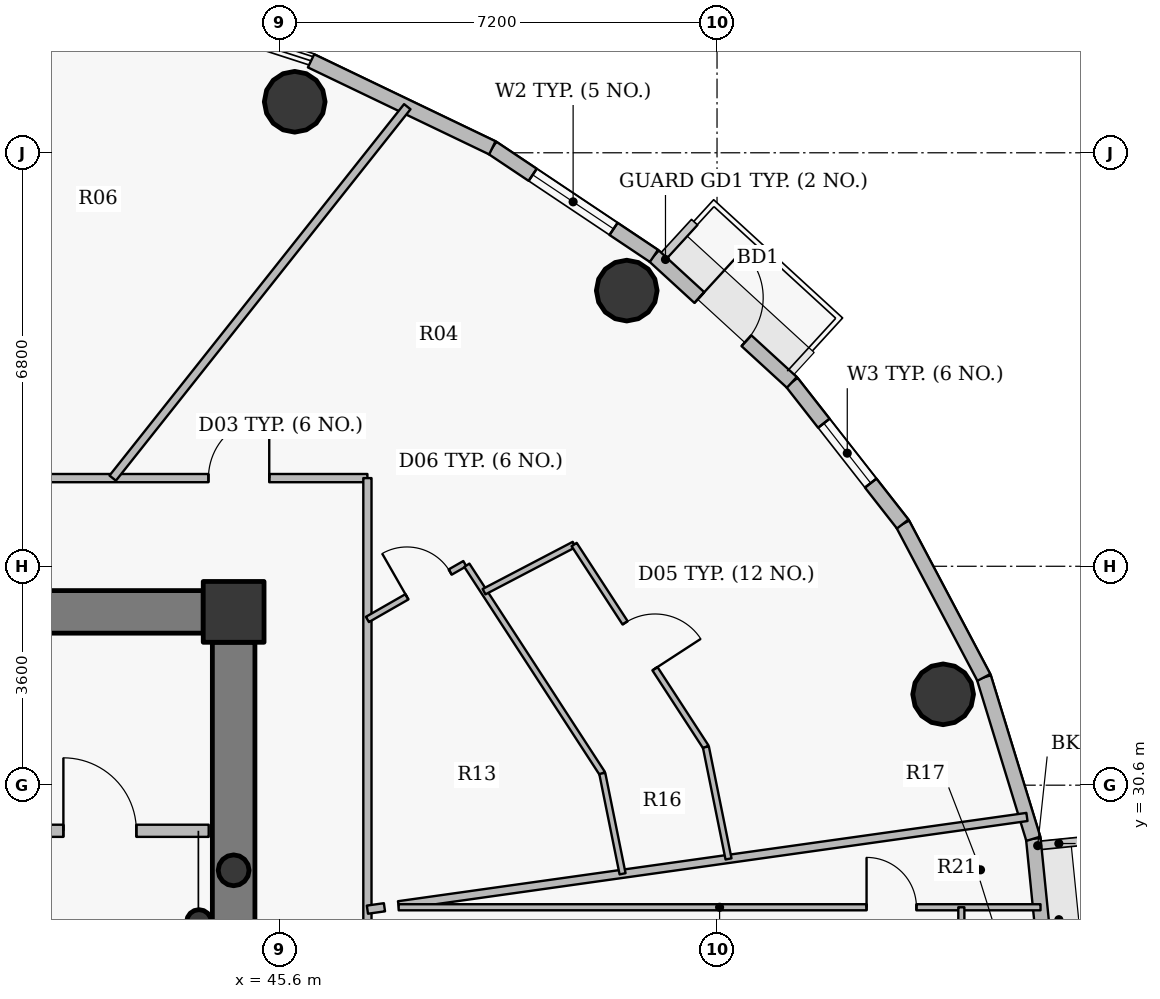
"""IFC4 building model, lengths in metres.
Left out: names, types, materials, properties, quantities, classifications, styles, units other than length and angle.
Written with IfcOpenShell. Run it as: python <this file> out.ifc"""

import sys

from ifc_helpers import new_model, si_unit, direction, frame, frame_2d, origin, origin_2d, place, context, subcontext, project, spatial, rectangle, hollow_circle, extrude, source, transform, mapped, element, fill, save


model = new_model("IFC4")
c1 = context("Model", 3, precision=1e-05, world=origin(), true_north=direction((0.0, 1.0)))
c2 = subcontext(c1, "Body", "Model", "MODEL_VIEW")
j1 = project(units=[si_unit("LENGTHUNIT", "METRE"), si_unit("PLANEANGLEUNIT", "RADIAN")], contexts=[c1])
p1 = place(None, origin())
s1 = spatial("IfcSite", under=j1, at=p1, CompositionType="ELEMENT")
p2 = place(p1, origin())
s2 = spatial("IfcBuilding", under=s1, at=p2, CompositionType="ELEMENT")
p3 = place(p2, frame((0.0, 0.0, 276.75)))
s3 = spatial("IfcBuildingStorey", under=s2, at=p3, CompositionType="ELEMENT", Elevation=276.75)
p4 = place(p3, frame((44.85, 33.45, 0.0), z_axis=(0.0, 0.0, 1.0), x_axis=(1.0, 0.0, 0.0)))
e1 = element("IfcColumn", 1, at=p4, inside=s3, PredefinedType="COLUMN", context=c2, shape_type="SweptSolid", body=[
    extrude(rectangle(XDim=1.0, YDim=1.0, at=origin_2d()), origin(), (0.0, 0.0, 1.0), 3.75),
])
p5 = place(p3, frame((44.28, 28.35, 0.0), z_axis=(0.0, 0.0, 1.0), x_axis=(1.0, 0.0, 0.0)))
e2 = element("IfcColumn", 2, at=p5, inside=s3, PredefinedType="COLUMN", context=c2, shape_type="SweptSolid", body=[
    extrude(hollow_circle(Radius=0.203, WallThickness=0.016, at=origin_2d()), origin(), (0.0, 0.0, 1.0), 3.75),
])
p6 = place(p3, frame((27.65, 33.45, 0.0), z_axis=(0.0, 0.0, 1.0), x_axis=(1.0, 0.0, 0.0)))
e3 = element("IfcWall", 3, at=p6, inside=s3, PredefinedType="SHEAR", context=c2, shape_type="SweptSolid", body=[
    extrude(rectangle(XDim=16.7, YDim=0.7, at=frame_2d((8.35, 0.0))), origin(), (0.0, 0.0, 1.0), 3.05),
])
p7 = place(p6, frame((12.775, 0.0, 0.0)))
e4 = element("IfcOpeningElement", 4, at=p7, cuts=e3, PredefinedType="OPENING", context=c2, shape_type="SweptSolid", body=[
    extrude(rectangle(XDim=1.15, YDim=2.15, at=origin_2d()), frame((0.575, 0.36, 1.075), z_axis=(0.0, -1.0, 0.0), x_axis=(1.0, 0.0, 0.0)), (0.0, 0.0, 1.0), 0.72),
])
p8 = place(p3, frame((44.85, 32.95, 0.0), z_axis=(0.0, 0.0, 1.0), x_axis=(0.0, -1.0, 0.0)))
e5 = element("IfcWall", 5, at=p8, inside=s3, PredefinedType="SHEAR", context=c2, shape_type="SweptSolid", body=[
    extrude(rectangle(XDim=11.9, YDim=0.7, at=frame_2d((5.95, 0.0))), origin(), (0.0, 0.0, 1.0), 3.05),
])
for number, where, z_axis, x_axis in (
    (6, (56.519, 32.094, 0.0), (0.0, 0.0, 1.0), (1.0, 0.0, 0.0)),
    (7, (51.315, 38.733, 0.0), (0.0, 0.0, 1.0), (1.0, 0.0, 0.0)),
    (8, (45.854, 41.839, 0.0), (0.0, 0.0, 1.0), (1.0, 0.0, 0.0)),
):
    element("IfcColumn", number, at=place(p3, frame(where, z_axis=z_axis, x_axis=x_axis)), inside=s3, PredefinedType="COLUMN", context=c2, shape_type="SweptSolid", body=[
        extrude(hollow_circle(Radius=0.5, WallThickness=0.032, at=origin_2d()), origin(), (0.0, 0.0, 1.0), 3.75),
    ])
p9 = place(p3, frame((44.85, 29.2, 0.0), z_axis=(0.0, 0.0, 1.0), x_axis=(1.0, 0.0, 0.0)))
e9 = element("IfcColumn", 9, at=p9, inside=s3, PredefinedType="COLUMN", context=c2, shape_type="SweptSolid", body=[
    extrude(hollow_circle(Radius=0.254, WallThickness=0.02, at=origin_2d()), origin(), (0.0, 0.0, 1.0), 3.75),
])
p10 = place(p3, frame((58.002, 29.719, 0.0), z_axis=(0.0, 0.0, 1.0), x_axis=(0.099972526841, -0.99499019788, 0.0)))
e10 = element("IfcWall", 10, at=p10, inside=s3, PredefinedType="SOLIDWALL", context=c2, shape_type="SweptSolid", body=[
    extrude(rectangle(XDim=2.733, YDim=0.24, at=frame_2d((1.366, 0.0))), origin(), (0.0, 0.0, 1.0), 3.5),
])
p11 = place(p3, frame((57.188, 32.372, 0.0), z_axis=(0.0, 0.0, 1.0), x_axis=(0.2931213403, -0.956075248012, 0.0)))
e11 = element("IfcWall", 11, at=p11, inside=s3, PredefinedType="SOLIDWALL", context=c2, shape_type="SweptSolid", body=[
    extrude(rectangle(XDim=2.775, YDim=0.24, at=frame_2d((1.388, 0.0))), origin(), (0.0, 0.0, 1.0), 3.5),
])
p12 = place(p3, frame((55.854, 34.895, 0.0), z_axis=(0.0, 0.0, 1.0), x_axis=(0.467628269026, -0.883925224218, 0.0)))
e12 = element("IfcWall", 12, at=p12, inside=s3, PredefinedType="SOLIDWALL", context=c2, shape_type="SweptSolid", body=[
    extrude(rectangle(XDim=2.854, YDim=0.24, at=frame_2d((1.427, 0.0))), origin(), (0.0, 0.0, 1.0), 3.5),
])
p13 = place(p3, frame((54.03, 37.225, 0.0), z_axis=(0.0, 0.0, 1.0), x_axis=(0.616337186556, -0.787482363275, 0.0)))
e13 = element("IfcWall", 13, at=p13, inside=s3, PredefinedType="SOLIDWALL", context=c2, shape_type="SweptSolid", body=[
    extrude(rectangle(XDim=2.958, YDim=0.24, at=frame_2d((1.479, 0.0))), origin(), (0.0, 0.0, 1.0), 3.5),
])
p14 = place(p13, frame((0.854, 0.0, 0.9)))
e14 = element("IfcOpeningElement", 14, at=p14, cuts=e13, PredefinedType="OPENING", context=c2, shape_type="SweptSolid", body=[
    extrude(rectangle(XDim=1.25, YDim=1.65, at=origin_2d()), frame((0.625, 0.13, 0.825), z_axis=(0.0, -1.0, 0.0), x_axis=(1.0, 0.0, 0.0)), (0.0, 0.0, 1.0), 0.26),
])
p15 = place(p3, frame((51.762, 39.304, 0.0), z_axis=(0.0, 0.0, 1.0), x_axis=(0.737068506972, -0.675818034703, 0.0)))
e15 = element("IfcWall", 15, at=p15, inside=s3, PredefinedType="SOLIDWALL", context=c2, shape_type="SweptSolid", body=[
    extrude(rectangle(XDim=3.077, YDim=0.24, at=frame_2d((1.539, 0.0))), origin(), (0.0, 0.0, 1.0), 3.5),
])
p16 = place(p15, frame((1.014, 0.0, 0.0)))
e16 = element("IfcOpeningElement", 16, at=p16, cuts=e15, PredefinedType="OPENING", context=c2, shape_type="SweptSolid", body=[
    extrude(rectangle(XDim=1.05, YDim=2.15, at=origin_2d()), frame((0.525, 0.13, 1.075), z_axis=(0.0, -1.0, 0.0), x_axis=(1.0, 0.0, 0.0)), (0.0, 0.0, 1.0), 0.26),
])
p17 = place(p3, frame((49.104, 41.082, 0.0), z_axis=(0.0, 0.0, 1.0), x_axis=(0.831250592635, -0.55589787933, 0.0)))
e17 = element("IfcWall", 17, at=p17, inside=s3, PredefinedType="SOLIDWALL", context=c2, shape_type="SweptSolid", body=[
    extrude(rectangle(XDim=3.197, YDim=0.24, at=frame_2d((1.599, 0.0))), origin(), (0.0, 0.0, 1.0), 3.5),
])
p18 = place(p17, frame((0.798, 0.0, 0.9)))
e18 = element("IfcOpeningElement", 18, at=p18, cuts=e17, PredefinedType="OPENING", context=c2, shape_type="SweptSolid", body=[
    extrude(rectangle(XDim=1.6, YDim=1.75, at=origin_2d()), frame((0.8, 0.13, 0.875), z_axis=(0.0, -1.0, 0.0), x_axis=(1.0, 0.0, 0.0)), (0.0, 0.0, 1.0), 0.26),
])
p19 = place(p3, frame((46.123, 42.512, 0.0), z_axis=(0.0, 0.0, 1.0), x_axis=(0.901573741254, -0.43262546051, 0.0)))
e19 = element("IfcWall", 19, at=p19, inside=s3, PredefinedType="SOLIDWALL", context=c2, shape_type="SweptSolid", body=[
    extrude(rectangle(XDim=3.307, YDim=0.24, at=frame_2d((1.653, 0.0))), origin(), (0.0, 0.0, 1.0), 3.5),
])
p20 = place(p3, frame((35.95, 29.85, 0.0), z_axis=(0.0, 0.0, 1.0), x_axis=(1.0, 0.0, 0.0)))
e20 = element("IfcWall", 20, at=p20, inside=s3, PredefinedType="PARTITIONING", context=c2, shape_type="SweptSolid", body=[
    extrude(rectangle(XDim=8.49, YDim=0.2, at=frame_2d((4.245, 0.0))), origin(), (0.0, 0.0, 1.0), 3.085),
])
p21 = place(p20, frame((6.1, 0.0, 0.0)))
e21 = element("IfcOpeningElement", 21, at=p21, cuts=e20, PredefinedType="OPENING", context=c2, shape_type="SweptSolid", body=[
    extrude(rectangle(XDim=1.2, YDim=2.15, at=origin_2d()), frame((0.6, 0.11, 1.075), z_axis=(0.0, -1.0, 0.0), x_axis=(1.0, 0.0, 0.0)), (0.0, 0.0, 1.0), 0.22),
])
p22 = place(p20, frame((0.37, 0.0, 0.0)))
e22 = element("IfcOpeningElement", 22, at=p22, cuts=e20, PredefinedType="OPENING", context=c2, shape_type="SweptSolid", body=[
    extrude(rectangle(XDim=1.15, YDim=2.15, at=origin_2d()), frame((0.575, 0.11, 1.075), z_axis=(0.0, -1.0, 0.0), x_axis=(1.0, 0.0, 0.0)), (0.0, 0.0, 1.0), 0.22),
])
p23 = place(p20, frame((2.425, 0.0, 0.0)))
e23 = element("IfcOpeningElement", 23, at=p23, cuts=e20, PredefinedType="OPENING", context=c2, shape_type="SweptSolid", body=[
    extrude(rectangle(XDim=1.05, YDim=2.15, at=origin_2d()), frame((0.525, 0.11, 1.075), z_axis=(0.0, -1.0, 0.0), x_axis=(1.0, 0.0, 0.0)), (0.0, 0.0, 1.0), 0.22),
])
p24 = place(p3, frame((36.95, 35.65, 0.0), z_axis=(0.0, 0.0, 1.0), x_axis=(1.0, 0.0, 0.0)))
e24 = element("IfcWall", 24, at=p24, inside=s3, PredefinedType="PARTITIONING", context=c2, shape_type="SweptSolid", body=[
    extrude(rectangle(XDim=10.1, YDim=0.135, at=frame_2d((5.05, 0.0))), origin(), (0.0, 0.0, 1.0), 3.035),
])
p25 = place(p24, frame((7.486, 0.0, 0.0)))
e25 = element("IfcOpeningElement", 25, at=p25, cuts=e24, PredefinedType="OPENING", context=c2, shape_type="SweptSolid", body=[
    extrude(rectangle(XDim=1.0, YDim=2.15, at=origin_2d()), frame((0.5, 0.078, 1.075), z_axis=(0.0, -1.0, 0.0), x_axis=(1.0, 0.0, 0.0)), (0.0, 0.0, 1.0), 0.155),
])
p26 = place(p24, frame((3.272, 0.0, 0.0)))
e26 = element("IfcOpeningElement", 26, at=p26, cuts=e24, PredefinedType="OPENING", context=c2, shape_type="SweptSolid", body=[
    extrude(rectangle(XDim=1.0, YDim=2.15, at=origin_2d()), frame((0.5, 0.078, 1.075), z_axis=(0.0, -1.0, 0.0), x_axis=(1.0, 0.0, 0.0)), (0.0, 0.0, 1.0), 0.155),
])
p27 = place(p3, frame((42.861, 35.65, 0.0), z_axis=(0.0, 0.0, 1.0), x_axis=(0.621439784824, 0.783461928774, 0.0)))
e27 = element("IfcWall", 27, at=p27, inside=s3, PredefinedType="PARTITIONING", context=c2, shape_type="SweptSolid", body=[
    extrude(rectangle(XDim=7.796, YDim=0.135, at=frame_2d((3.898, 0.0))), origin(), (0.0, 0.0, 1.0), 2.985),
])
p28 = place(p3, frame((47.05, 18.503, 0.0), z_axis=(0.0, 0.0, 1.0), x_axis=(0.0, 1.0, 0.0)))
e28 = element("IfcWall", 28, at=p28, inside=s3, PredefinedType="PARTITIONING", context=c2, shape_type="SweptSolid", body=[
    extrude(rectangle(XDim=17.147, YDim=0.135, at=frame_2d((8.574, 0.0))), origin(), (0.0, 0.0, 1.0), 3.035),
])
p29 = place(p28, frame((4.545, 0.0, 0.0)))
e29 = element("IfcOpeningElement", 29, at=p29, cuts=e28, PredefinedType="OPENING", context=c2, shape_type="SweptSolid", body=[
    extrude(rectangle(XDim=1.0, YDim=2.15, at=origin_2d()), frame((0.5, 0.078, 1.075), z_axis=(0.0, -1.0, 0.0), x_axis=(1.0, 0.0, 0.0)), (0.0, 0.0, 1.0), 0.155),
])
p30 = place(p3, frame((47.05, 28.553, 0.0), z_axis=(0.0, 0.0, 1.0), x_axis=(0.990308552968, 0.138884736087, 0.0)))
e30 = element("IfcWall", 30, at=p30, inside=s3, PredefinedType="PARTITIONING", context=c2, shape_type="SweptSolid", body=[
    extrude(rectangle(XDim=0.283, YDim=0.135, at=frame_2d((0.142, 0.0))), origin(), (0.0, 0.0, 1.0), 3.5),
])
p31 = place(p3, frame((47.05, 33.326, 0.0), z_axis=(0.0, 0.0, 1.0), x_axis=(0.867827775188, 0.496865125172, 0.0)))
e31 = element("IfcWall", 31, at=p31, inside=s3, PredefinedType="PARTITIONING", context=c2, shape_type="SweptSolid", body=[
    extrude(rectangle(XDim=1.846, YDim=0.1, at=frame_2d((0.923, 0.0))), origin(), (0.0, 0.0, 1.0), 3.5),
])
p32 = place(p31, frame((0.749, 0.0, 0.0)))
e32 = element("IfcOpeningElement", 32, at=p32, cuts=e31, PredefinedType="OPENING", context=c2, shape_type="SweptSolid", body=[
    extrude(rectangle(XDim=0.82, YDim=2.1, at=origin_2d()), frame((0.41, 0.06, 1.05), z_axis=(0.0, -1.0, 0.0), x_axis=(1.0, 0.0, 0.0)), (0.0, 0.0, 1.0), 0.12),
])
p33 = place(p3, frame((47.562, 28.625, 0.0), z_axis=(0.0, 0.0, 1.0), x_axis=(0.990269276455, 0.139164507362, 0.0)))
e33 = element("IfcWall", 33, at=p33, inside=s3, PredefinedType="PARTITIONING", context=c2, shape_type="SweptSolid", body=[
    extrude(rectangle(XDim=10.437, YDim=0.135, at=frame_2d((5.218, 0.0))), origin(), (0.0, 0.0, 1.0), 2.985),
])
p34 = place(p3, frame((47.564, 28.592, 0.0), z_axis=(0.0, 0.0, 1.0), x_axis=(1.0, 0.0, 0.0)))
e34 = element("IfcWall", 34, at=p34, inside=s3, PredefinedType="PARTITIONING", context=c2, shape_type="SweptSolid", body=[
    extrude(rectangle(XDim=10.555, YDim=0.1, at=frame_2d((5.278, 0.0))), origin(), (0.0, 0.0, 1.0), 2.985),
])
p35 = place(p34, frame((7.695, 0.0, 0.0)))
e35 = element("IfcOpeningElement", 35, at=p35, cuts=e34, PredefinedType="OPENING", context=c2, shape_type="SweptSolid", body=[
    extrude(rectangle(XDim=0.82, YDim=2.1, at=origin_2d()), frame((0.41, 0.06, 1.05), z_axis=(0.0, -1.0, 0.0), x_axis=(1.0, 0.0, 0.0)), (0.0, 0.0, 1.0), 0.12),
])
p36 = place(p3, frame((48.685, 34.217, 0.0), z_axis=(0.0, 0.0, 1.0), x_axis=(0.54540855562, -0.8381703332, 0.0)))
e36 = element("IfcWall", 36, at=p36, inside=s3, PredefinedType="PARTITIONING", context=c2, shape_type="SweptSolid", body=[
    extrude(rectangle(XDim=4.084, YDim=0.1, at=frame_2d((2.042, 0.0))), origin(), (0.0, 0.0, 1.0), 3.035),
])
p37 = place(p3, frame((48.968, 33.782, 0.0), z_axis=(0.0, 0.0, 1.0), x_axis=(0.886102824681, 0.463488709779, 0.0)))
e37 = element("IfcWall", 37, at=p37, inside=s3, PredefinedType="PARTITIONING", context=c2, shape_type="SweptSolid", body=[
    extrude(rectangle(XDim=1.672, YDim=0.1, at=frame_2d((0.836, 0.0))), origin(), (0.0, 0.0, 1.0), 3.5),
])
p38 = place(p3, frame((50.45, 34.558, 0.0), z_axis=(0.0, 0.0, 1.0), x_axis=(0.545448348881, -0.838144437853, 0.0)))
e38 = element("IfcWall", 38, at=p38, inside=s3, PredefinedType="PARTITIONING", context=c2, shape_type="SweptSolid", body=[
    extrude(rectangle(XDim=3.973, YDim=0.1, at=frame_2d((1.986, 0.0))), origin(), (0.0, 0.0, 1.0), 3.035),
])
p39 = place(p38, frame((1.536, 0.0, 0.0)))
e39 = element("IfcOpeningElement", 39, at=p39, cuts=e38, PredefinedType="OPENING", context=c2, shape_type="SweptSolid", body=[
    extrude(rectangle(XDim=0.9, YDim=2.1, at=origin_2d()), frame((0.45, 0.06, 1.05), z_axis=(0.0, -1.0, 0.0), x_axis=(1.0, 0.0, 0.0)), (0.0, 0.0, 1.0), 0.12),
])
p40 = place(p3, frame((50.913, 30.794, 0.0), z_axis=(0.0, 0.0, 1.0), x_axis=(0.198233557602, -0.980154812588, 0.0)))
e40 = element("IfcWall", 40, at=p40, inside=s3, PredefinedType="PARTITIONING", context=c2, shape_type="SweptSolid", body=[
    extrude(rectangle(XDim=1.685, YDim=0.1, at=frame_2d((0.842, 0.0))), origin(), (0.0, 0.0, 1.0), 3.035),
])
p41 = place(p3, frame((52.617, 31.228, 0.0), z_axis=(0.0, 0.0, 1.0), x_axis=(0.198191443997, -0.980163329005, 0.0)))
e41 = element("IfcWall", 41, at=p41, inside=s3, PredefinedType="PARTITIONING", context=c2, shape_type="SweptSolid", body=[
    extrude(rectangle(XDim=1.877, YDim=0.1, at=frame_2d((0.939, 0.0))), origin(), (0.0, 0.0, 1.0), 3.035),
])
p42 = place(p3, frame((56.818, 20.917, 0.0), z_axis=(0.0, 0.0, 1.0), x_axis=(0.0, 1.0, 0.0)))
e42 = element("IfcWall", 42, at=p42, inside=s3, PredefinedType="PARTITIONING", context=c2, shape_type="SweptSolid", body=[
    extrude(rectangle(XDim=7.675, YDim=0.1, at=frame_2d((3.837, 0.0))), origin(), (0.0, 0.0, 1.0), 2.985),
])
p43 = place(p42, frame((3.388, 0.0, 0.0)))
e43 = element("IfcOpeningElement", 43, at=p43, cuts=e42, PredefinedType="OPENING", context=c2, shape_type="SweptSolid", body=[
    extrude(rectangle(XDim=0.9, YDim=2.1, at=origin_2d()), frame((0.45, 0.06, 1.05), z_axis=(0.0, -1.0, 0.0), x_axis=(1.0, 0.0, 0.0)), (0.0, 0.0, 1.0), 0.12),
])
p44 = place(p3, frame((45.2, 33.8, 0.0), z_axis=(0.0, 0.0, 1.0), x_axis=(-1.0, 0.0, 0.0)))
e44 = element("IfcWall", 44, at=p44, inside=s3, PredefinedType="PARTITIONING", context=c2, shape_type="SweptSolid", body=[
    extrude(rectangle(XDim=0.84, YDim=0.135, at=frame_2d((0.42, 0.0))), origin(), (0.0, 0.0, 1.0), 3.035),
])
p45 = place(p3, frame((45.2, 32.96, 0.0), z_axis=(0.0, 0.0, 1.0), x_axis=(0.0, 1.0, 0.0)))
e45 = element("IfcWall", 45, at=p45, inside=s3, PredefinedType="PARTITIONING", context=c2, shape_type="SweptSolid", body=[
    extrude(rectangle(XDim=0.532, YDim=0.135, at=frame_2d((0.266, 0.0))), origin(), (0.0, 0.0, 1.0), 3.5),
])
m1 = source(origin(), c2, "Body", "SweptSolid", [
    extrude(rectangle(XDim=1.25, YDim=1.65, at=origin_2d()), frame((0.625, 0.03, 0.825), z_axis=(0.0, -1.0, 0.0), x_axis=(1.0, 0.0, 0.0)), (0.0, 0.0, 1.0), 0.06),
])
p46 = place(p14, origin())
e46 = element("IfcWindow", 46, at=p46, inside=s3, PartitioningType="SINGLE_PANEL", PredefinedType="WINDOW", context=c2, shape_type="MappedRepresentation", body=[
    mapped(m1, transform((0.0, 0.0, 0.0), x_axis=(1.0, 0.0, 0.0), y_axis=(0.0, 1.0, 0.0), z_axis=(0.0, 0.0, 1.0), scale=1.0)),
])
fill(e14, e46)
m2 = source(origin(), c2, "Body", "SweptSolid", [
    extrude(rectangle(XDim=1.05, YDim=2.15, at=origin_2d()), frame((0.525, 0.025, 1.075), z_axis=(0.0, -1.0, 0.0), x_axis=(1.0, 0.0, 0.0)), (0.0, 0.0, 1.0), 0.05),
])
p47 = place(p16, origin())
e47 = element("IfcDoor", 47, at=p47, inside=s3, OperationType="SINGLE_SWING_LEFT", PredefinedType="DOOR", context=c2, shape_type="MappedRepresentation", body=[
    mapped(m2, transform((0.0, 0.0, 0.0), x_axis=(1.0, 0.0, 0.0), y_axis=(0.0, 1.0, 0.0), z_axis=(0.0, 0.0, 1.0), scale=1.0)),
])
fill(e16, e47)
m3 = source(origin(), c2, "Body", "SweptSolid", [
    extrude(rectangle(XDim=1.6, YDim=1.75, at=origin_2d()), frame((0.8, 0.03, 0.875), z_axis=(0.0, -1.0, 0.0), x_axis=(1.0, 0.0, 0.0)), (0.0, 0.0, 1.0), 0.06),
])
p48 = place(p18, origin())
e48 = element("IfcWindow", 48, at=p48, inside=s3, PartitioningType="DOUBLE_PANEL_VERTICAL", PredefinedType="WINDOW", context=c2, shape_type="MappedRepresentation", body=[
    mapped(m3, transform((0.0, 0.0, 0.0), x_axis=(1.0, 0.0, 0.0), y_axis=(0.0, 1.0, 0.0), z_axis=(0.0, 0.0, 1.0), scale=1.0)),
])
fill(e18, e48)
m4 = source(origin(), c2, "Body", "SweptSolid", [
    extrude(rectangle(XDim=1.2, YDim=2.15, at=origin_2d()), frame((0.6, 0.025, 1.075), z_axis=(0.0, -1.0, 0.0), x_axis=(1.0, 0.0, 0.0)), (0.0, 0.0, 1.0), 0.05),
])
p49 = place(p21, origin())
e49 = element("IfcDoor", 49, at=p49, inside=s3, OperationType="SINGLE_SWING_LEFT", PredefinedType="DOOR", context=c2, shape_type="MappedRepresentation", body=[
    mapped(m4, transform((0.0, 0.0, 0.0), x_axis=(1.0, 0.0, 0.0), y_axis=(0.0, 1.0, 0.0), z_axis=(0.0, 0.0, 1.0), scale=1.0)),
])
fill(e21, e49)
m5 = source(origin(), c2, "Body", "SweptSolid", [
    extrude(rectangle(XDim=1.0, YDim=2.15, at=origin_2d()), frame((0.5, 0.025, 1.075), z_axis=(0.0, -1.0, 0.0), x_axis=(1.0, 0.0, 0.0)), (0.0, 0.0, 1.0), 0.05),
])
p50 = place(p25, origin())
e50 = element("IfcDoor", 50, at=p50, inside=s3, OperationType="SINGLE_SWING_RIGHT", PredefinedType="DOOR", context=c2, shape_type="MappedRepresentation", body=[
    mapped(m5, transform((0.0, 0.0, 0.0), x_axis=(1.0, 0.0, 0.0), y_axis=(0.0, 1.0, 0.0), z_axis=(0.0, 0.0, 1.0), scale=1.0)),
])
fill(e25, e50)
m6 = source(origin(), c2, "Body", "SweptSolid", [
    extrude(rectangle(XDim=0.82, YDim=2.1, at=origin_2d()), frame((0.41, 0.025, 1.05), z_axis=(0.0, -1.0, 0.0), x_axis=(1.0, 0.0, 0.0)), (0.0, 0.0, 1.0), 0.05),
])
p51 = place(p32, origin())
e51 = element("IfcDoor", 51, at=p51, inside=s3, OperationType="SINGLE_SWING_LEFT", PredefinedType="DOOR", context=c2, shape_type="MappedRepresentation", body=[
    mapped(m6, transform((0.0, 0.0, 0.0), x_axis=(1.0, 0.0, 0.0), y_axis=(0.0, 1.0, 0.0), z_axis=(0.0, 0.0, 1.0), scale=1.0)),
])
fill(e32, e51)
m7 = source(origin(), c2, "Body", "SweptSolid", [
    extrude(rectangle(XDim=0.9, YDim=2.1, at=origin_2d()), frame((0.45, 0.025, 1.05), z_axis=(0.0, -1.0, 0.0), x_axis=(1.0, 0.0, 0.0)), (0.0, 0.0, 1.0), 0.05),
])
p52 = place(p39, origin())
e52 = element("IfcDoor", 52, at=p52, inside=s3, OperationType="SINGLE_SWING_RIGHT", PredefinedType="DOOR", context=c2, shape_type="MappedRepresentation", body=[
    mapped(m7, transform((0.0, 0.0, 0.0), x_axis=(1.0, 0.0, 0.0), y_axis=(0.0, 1.0, 0.0), z_axis=(0.0, 0.0, 1.0), scale=1.0)),
])
fill(e39, e52)
p53 = place(p35, origin())
e53 = element("IfcDoor", 53, at=p53, inside=s3, OperationType="SINGLE_SWING_LEFT", PredefinedType="DOOR", context=c2, shape_type="MappedRepresentation", body=[
    mapped(m6, transform((0.0, 0.0, 0.0), x_axis=(1.0, 0.0, 0.0), y_axis=(0.0, 1.0, 0.0), z_axis=(0.0, 0.0, 1.0), scale=1.0)),
])
fill(e35, e53)
save(model, sys.argv[1])
